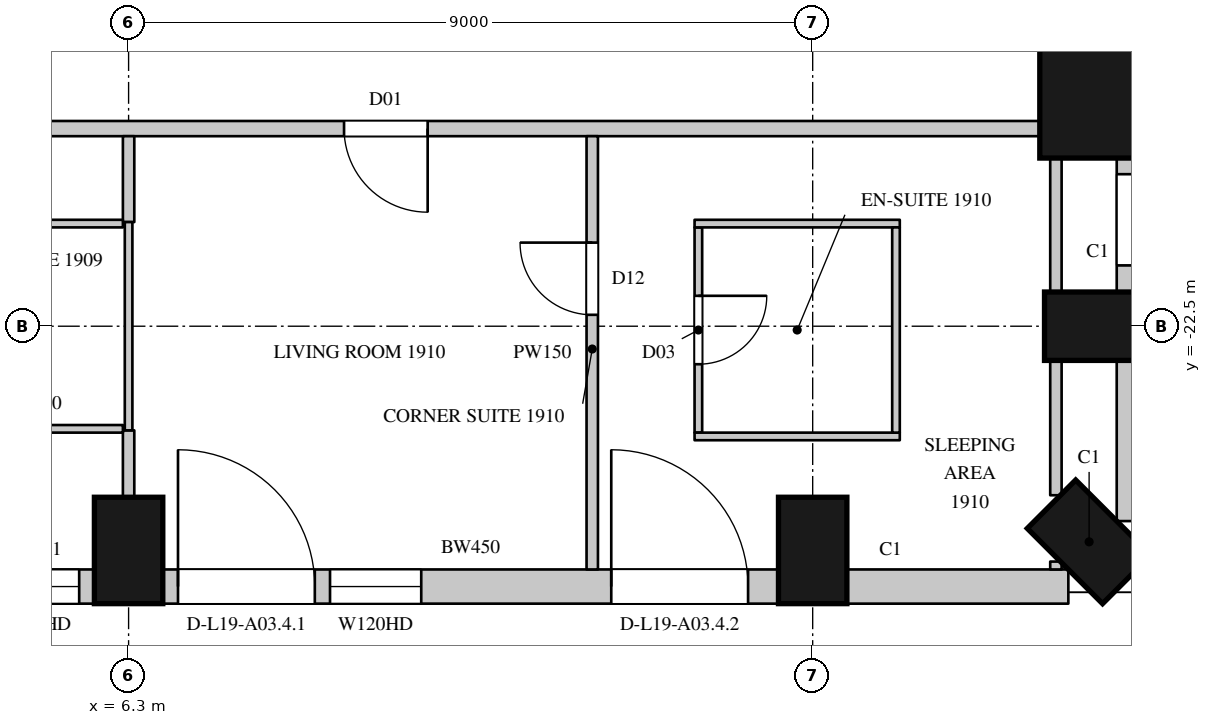
"""IFC4 building model, lengths in metres.
Left out: names, types, materials, properties, quantities, classifications, styles, units other than length and angle.
Written with IfcOpenShell. Run it as: python <this file> out.ifc"""

import sys

from ifc_helpers import new_model, si_unit, direction, frame, frame_2d, origin, origin_2d, place, context, subcontext, project, spatial, rectangle, circle, extrude, element, fill, save


model = new_model("IFC4")
c1 = context("Model", 3, precision=1e-05, world=origin(), true_north=direction((0.0, 1.0)))
c2 = subcontext(c1, "Body", "Model", "MODEL_VIEW")
j1 = project(units=[si_unit("LENGTHUNIT", "METRE"), si_unit("PLANEANGLEUNIT", "RADIAN")], contexts=[c1])
p1 = place(None, origin())
s1 = spatial("IfcSite", under=j1, at=p1, CompositionType="ELEMENT")
p2 = place(p1, origin())
s2 = spatial("IfcBuilding", under=s1, at=p2, CompositionType="ELEMENT")
p3 = place(p2, frame((0.0, 0.0, 98.7)))
s3 = spatial("IfcBuildingStorey", under=s2, at=p3, CompositionType="ELEMENT", Elevation=98.7)
for number, where, z_axis, x_axis in (
    (1, (6.3, -25.45, 0.0), (0.0, 0.0, 1.0), (1.0, 0.0, 0.0)),
    (2, (15.3, -25.45, 0.0), (0.0, 0.0, 1.0), (1.0, 0.0, 0.0)),
    (3, (18.937, -25.337, 0.0), (0.0, 0.0, 1.0), (0.707, 0.707, 0.0)),
    (4, (19.05, -22.5, 0.0), (0.0, 0.0, 1.0), (0.0, 1.0, 0.0)),
):
    element("IfcColumn", number, at=place(p3, frame(where, z_axis=z_axis, x_axis=x_axis)), inside=s3, PredefinedType="COLUMN", context=c2, shape_type="SweptSolid", body=[
        extrude(rectangle(XDim=0.9, YDim=1.4, at=origin_2d()), origin(), (0.0, 0.0, 1.0), 3.6),
    ])
p4 = place(p3, frame((19.088, -19.488, 0.0), z_axis=(0.0, 0.0, 1.0), x_axis=(1.0, 0.0, 0.0)))
e5 = element("IfcColumn", 5, at=p4, inside=s3, PredefinedType="COLUMN", context=c2, shape_type="SweptSolid", body=[
    extrude(circle(Radius=0.8, at=origin_2d()), origin(), (0.0, 0.0, 1.0), 3.6),
])
p5 = place(p3, frame((-2.25, -25.925, 0.0), z_axis=(0.0, 0.0, 1.0), x_axis=(1.0, 0.0, 0.0)))
e6 = element("IfcWall", 6, at=p5, inside=s3, PredefinedType="SOLIDWALL", context=c2, shape_type="SweptSolid", body=[
    extrude(rectangle(XDim=8.1, YDim=0.45, at=frame_2d((4.05, 0.0))), origin(), (0.0, 0.0, 1.0), 3.3),
])
p6 = place(p5, frame((0.2, 0.0, 0.0)))
e7 = element("IfcOpeningElement", 7, at=p6, cuts=e6, PredefinedType="OPENING", context=c2, shape_type="SweptSolid", body=[
    extrude(rectangle(XDim=1.8, YDim=2.4, at=frame_2d((0.9, 1.2))), frame((0.0, 0.235, 0.0), z_axis=(0.0, -1.0, 0.0), x_axis=(1.0, 0.0, 0.0)), (0.0, 0.0, 1.0), 0.47),
])
p7 = place(p5, frame((2.2, 0.0, 1.05)))
e8 = element("IfcOpeningElement", 8, at=p7, cuts=e6, PredefinedType="OPENING", context=c2, shape_type="SweptSolid", body=[
    extrude(rectangle(XDim=1.2, YDim=2.0, at=frame_2d((0.6, 1.0))), frame((0.0, 0.235, 0.0), z_axis=(0.0, -1.0, 0.0), x_axis=(1.0, 0.0, 0.0)), (0.0, 0.0, 1.0), 0.47),
])
p8 = place(p5, frame((4.7, 0.0, 0.0)))
e9 = element("IfcOpeningElement", 9, at=p8, cuts=e6, PredefinedType="OPENING", context=c2, shape_type="SweptSolid", body=[
    extrude(rectangle(XDim=1.8, YDim=2.4, at=frame_2d((0.9, 1.2))), frame((0.0, 0.235, 0.0), z_axis=(0.0, -1.0, 0.0), x_axis=(1.0, 0.0, 0.0)), (0.0, 0.0, 1.0), 0.47),
])
p9 = place(p5, frame((6.7, 0.0, 1.05)))
e10 = element("IfcOpeningElement", 10, at=p9, cuts=e6, PredefinedType="OPENING", context=c2, shape_type="SweptSolid", body=[
    extrude(rectangle(XDim=1.2, YDim=2.0, at=frame_2d((0.6, 1.0))), frame((0.0, 0.235, 0.0), z_axis=(0.0, -1.0, 0.0), x_axis=(1.0, 0.0, 0.0)), (0.0, 0.0, 1.0), 0.47),
])
p10 = place(p3, frame((6.75, -25.925, 0.0), z_axis=(0.0, 0.0, 1.0), x_axis=(1.0, 0.0, 0.0)))
e11 = element("IfcWall", 11, at=p10, inside=s3, PredefinedType="SOLIDWALL", context=c2, shape_type="SweptSolid", body=[
    extrude(rectangle(XDim=8.1, YDim=0.45, at=frame_2d((4.05, 0.0))), origin(), (0.0, 0.0, 1.0), 3.3),
])
p11 = place(p10, frame((0.2, 0.0, 0.0)))
e12 = element("IfcOpeningElement", 12, at=p11, cuts=e11, PredefinedType="OPENING", context=c2, shape_type="SweptSolid", body=[
    extrude(rectangle(XDim=1.8, YDim=2.4, at=frame_2d((0.9, 1.2))), frame((0.0, 0.235, 0.0), z_axis=(0.0, -1.0, 0.0), x_axis=(1.0, 0.0, 0.0)), (0.0, 0.0, 1.0), 0.47),
])
p12 = place(p10, frame((2.2, 0.0, 1.05)))
e13 = element("IfcOpeningElement", 13, at=p12, cuts=e11, PredefinedType="OPENING", context=c2, shape_type="SweptSolid", body=[
    extrude(rectangle(XDim=1.2, YDim=2.0, at=frame_2d((0.6, 1.0))), frame((0.0, 0.235, 0.0), z_axis=(0.0, -1.0, 0.0), x_axis=(1.0, 0.0, 0.0)), (0.0, 0.0, 1.0), 0.47),
])
p13 = place(p10, frame((5.9, 0.0, 0.0)))
e14 = element("IfcOpeningElement", 14, at=p13, cuts=e11, PredefinedType="OPENING", context=c2, shape_type="SweptSolid", body=[
    extrude(rectangle(XDim=1.8, YDim=2.4, at=frame_2d((0.9, 1.2))), frame((0.0, 0.235, 0.0), z_axis=(0.0, -1.0, 0.0), x_axis=(1.0, 0.0, 0.0)), (0.0, 0.0, 1.0), 0.47),
])
p14 = place(p3, frame((15.75, -25.925, 0.0), z_axis=(0.0, 0.0, 1.0), x_axis=(1.0, 0.0, 0.0)))
e15 = element("IfcWall", 15, at=p14, inside=s3, PredefinedType="SOLIDWALL", context=c2, shape_type="SweptSolid", body=[
    extrude(rectangle(XDim=2.914, YDim=0.45, at=frame_2d((1.457, 0.0))), origin(), (0.0, 0.0, 1.0), 3.3),
])
p15 = place(p3, frame((19.525, -25.064, 0.0), z_axis=(0.0, 0.0, 1.0), x_axis=(0.0, 1.0, 0.0)))
e16 = element("IfcWall", 16, at=p15, inside=s3, PredefinedType="SOLIDWALL", context=c2, shape_type="SweptSolid", body=[
    extrude(rectangle(XDim=2.114, YDim=0.45, at=frame_2d((1.057, 0.0))), origin(), (0.0, 0.0, 1.0), 3.3),
])
p16 = place(p3, frame((19.525, -22.05, 0.0), z_axis=(0.0, 0.0, 1.0), x_axis=(0.0, 1.0, 0.0)))
e17 = element("IfcWall", 17, at=p16, inside=s3, PredefinedType="SOLIDWALL", context=c2, shape_type="SweptSolid", body=[
    extrude(rectangle(XDim=1.792, YDim=0.45, at=frame_2d((0.896, 0.0))), origin(), (0.0, 0.0, 1.0), 3.3),
])
p17 = place(p16, frame((0.35, 0.0, 1.05)))
e18 = element("IfcOpeningElement", 18, at=p17, cuts=e17, PredefinedType="OPENING", context=c2, shape_type="SweptSolid", body=[
    extrude(rectangle(XDim=1.2, YDim=2.0, at=frame_2d((0.6, 1.0))), frame((0.0, 0.235, 0.0), z_axis=(0.0, -1.0, 0.0), x_axis=(1.0, 0.0, 0.0)), (0.0, 0.0, 1.0), 0.47),
])
p18 = place(p3, frame((-23.765, -19.9, 0.0), z_axis=(0.0, 0.0, 1.0), x_axis=(1.0, 0.0, 0.0)))
e19 = element("IfcWall", 19, at=p18, inside=s3, PredefinedType="PARTITIONING", context=c2, shape_type="SweptSolid", body=[
    extrude(rectangle(XDim=42.125, YDim=0.2, at=frame_2d((21.063, 0.0))), origin(), (0.0, 0.0, 1.0), 3.3),
])
p19 = place(p18, frame((6.2, 0.0, 0.0)))
e20 = element("IfcOpeningElement", 20, at=p19, cuts=e19, PredefinedType="OPENING", context=c2, shape_type="SweptSolid", body=[
    extrude(rectangle(XDim=0.95, YDim=2.2, at=frame_2d((0.475, 1.1))), frame((0.0, 0.11, 0.0), z_axis=(0.0, -1.0, 0.0), x_axis=(1.0, 0.0, 0.0)), (0.0, 0.0, 1.0), 0.22),
])
p20 = place(p18, frame((14.1, 0.0, 0.0)))
e21 = element("IfcOpeningElement", 21, at=p20, cuts=e19, PredefinedType="OPENING", context=c2, shape_type="SweptSolid", body=[
    extrude(rectangle(XDim=1.1, YDim=2.4, at=frame_2d((0.55, 1.2))), frame((0.0, 0.11, 0.0), z_axis=(0.0, -1.0, 0.0), x_axis=(1.0, 0.0, 0.0)), (0.0, 0.0, 1.0), 0.22),
])
p21 = place(p18, frame((24.2, 0.0, 0.0)))
e22 = element("IfcOpeningElement", 22, at=p21, cuts=e19, PredefinedType="OPENING", context=c2, shape_type="SweptSolid", body=[
    extrude(rectangle(XDim=0.95, YDim=2.2, at=frame_2d((0.475, 1.1))), frame((0.0, 0.11, 0.0), z_axis=(0.0, -1.0, 0.0), x_axis=(1.0, 0.0, 0.0)), (0.0, 0.0, 1.0), 0.22),
])
p22 = place(p18, frame((32.9, 0.0, 0.0)))
e23 = element("IfcOpeningElement", 23, at=p22, cuts=e19, PredefinedType="OPENING", context=c2, shape_type="SweptSolid", body=[
    extrude(rectangle(XDim=1.1, YDim=2.4, at=frame_2d((0.55, 1.2))), frame((0.0, 0.11, 0.0), z_axis=(0.0, -1.0, 0.0), x_axis=(1.0, 0.0, 0.0)), (0.0, 0.0, 1.0), 0.22),
])
p23 = place(p3, frame((6.3, -24.75, 0.0), z_axis=(0.0, 0.0, 1.0), x_axis=(0.0, 1.0, 0.0)))
e24 = element("IfcWall", 24, at=p23, inside=s3, PredefinedType="PARTITIONING", context=c2, shape_type="SweptSolid", body=[
    extrude(rectangle(XDim=0.88, YDim=0.15, at=frame_2d((0.44, 0.0))), origin(), (0.0, 0.0, 1.0), 2.75),
])
p24 = place(p3, frame((6.3, -21.13, 0.0), z_axis=(0.0, 0.0, 1.0), x_axis=(0.0, 1.0, 0.0)))
e25 = element("IfcWall", 25, at=p24, inside=s3, PredefinedType="PARTITIONING", context=c2, shape_type="SweptSolid", body=[
    extrude(rectangle(XDim=1.13, YDim=0.15, at=frame_2d((0.565, 0.0))), origin(), (0.0, 0.0, 1.0), 2.75),
])
p25 = place(p3, frame((12.4, -25.7, 0.0), z_axis=(0.0, 0.0, 1.0), x_axis=(0.0, 1.0, 0.0)))
e26 = element("IfcWall", 26, at=p25, inside=s3, PredefinedType="PARTITIONING", context=c2, shape_type="SweptSolid", body=[
    extrude(rectangle(XDim=5.7, YDim=0.15, at=frame_2d((2.85, 0.0))), origin(), (0.0, 0.0, 1.0), 3.3),
])
p26 = place(p25, frame((3.35, 0.0, 0.0)))
e27 = element("IfcOpeningElement", 27, at=p26, cuts=e26, PredefinedType="OPENING", context=c2, shape_type="SweptSolid", body=[
    extrude(rectangle(XDim=0.95, YDim=2.2, at=frame_2d((0.475, 1.1))), frame((0.0, 0.085, 0.0), z_axis=(0.0, -1.0, 0.0), x_axis=(1.0, 0.0, 0.0)), (0.0, 0.0, 1.0), 0.17),
])
p27 = place(p3, frame((18.5, -25.7, 0.0), z_axis=(0.0, 0.0, 1.0), x_axis=(0.0, 1.0, 0.0)))
e28 = element("IfcWall", 28, at=p27, inside=s3, PredefinedType="PARTITIONING", context=c2, shape_type="SweptSolid", body=[
    extrude(rectangle(XDim=0.104, YDim=0.15, at=frame_2d((0.052, 0.0))), origin(), (0.0, 0.0, 1.0), 3.3),
])
p28 = place(p3, frame((18.5, -24.724, 0.0), z_axis=(0.0, 0.0, 1.0), x_axis=(0.0, 1.0, 0.0)))
e29 = element("IfcWall", 29, at=p28, inside=s3, PredefinedType="PARTITIONING", context=c2, shape_type="SweptSolid", body=[
    extrude(rectangle(XDim=1.774, YDim=0.15, at=frame_2d((0.887, 0.0))), origin(), (0.0, 0.0, 1.0), 3.3),
])
p29 = place(p3, frame((18.5, -22.05, 0.0), z_axis=(0.0, 0.0, 1.0), x_axis=(0.0, 1.0, 0.0)))
e30 = element("IfcWall", 30, at=p29, inside=s3, PredefinedType="PARTITIONING", context=c2, shape_type="SweptSolid", body=[
    extrude(rectangle(XDim=1.964, YDim=0.15, at=frame_2d((0.982, 0.0))), origin(), (0.0, 0.0, 1.0), 3.3),
])
for number, where, z_axis, x_axis in (
    (31, (3.854, -23.85, 0.0), (0.0, 0.0, 1.0), (1.0, 0.0, 0.0)),
    (32, (3.854, -21.15, 0.0), (0.0, 0.0, 1.0), (1.0, 0.0, 0.0)),
):
    element("IfcWall", number, at=place(p3, frame(where, z_axis=z_axis, x_axis=x_axis)), inside=s3, PredefinedType="PARTITIONING", context=c2, shape_type="SweptSolid", body=[
        extrude(rectangle(XDim=2.371, YDim=0.1, at=frame_2d((1.186, 0.0))), origin(), (0.0, 0.0, 1.0), 3.3),
    ])
p30 = place(p3, frame((6.3, -23.87, 0.0), z_axis=(0.0, 0.0, 1.0), x_axis=(0.0, 1.0, 0.0)))
e33 = element("IfcWall", 33, at=p30, inside=s3, PredefinedType="PARTITIONING", context=c2, shape_type="SweptSolid", body=[
    extrude(rectangle(XDim=2.74, YDim=0.1, at=frame_2d((1.37, 0.0))), origin(), (0.0, 0.0, 1.0), 2.75),
])
p31 = place(p3, frame((13.796, -23.9, 0.0), z_axis=(0.0, 0.0, 1.0), x_axis=(0.0, 1.0, 0.0)))
e34 = element("IfcWall", 34, at=p31, inside=s3, PredefinedType="PARTITIONING", context=c2, shape_type="SweptSolid", body=[
    extrude(rectangle(XDim=2.7, YDim=0.1, at=frame_2d((1.35, 0.0))), origin(), (0.0, 0.0, 1.0), 3.3),
])
p32 = place(p31, frame((0.9, 0.0, 0.0)))
e35 = element("IfcOpeningElement", 35, at=p32, cuts=e34, PredefinedType="OPENING", context=c2, shape_type="SweptSolid", body=[
    extrude(rectangle(XDim=0.9, YDim=2.2, at=frame_2d((0.45, 1.1))), frame((0.0, 0.06, 0.0), z_axis=(0.0, -1.0, 0.0), x_axis=(1.0, 0.0, 0.0)), (0.0, 0.0, 1.0), 0.12),
])
for number, where, z_axis, x_axis in (
    (36, (13.746, -23.95, 0.0), (0.0, 0.0, 1.0), (1.0, 0.0, 0.0)),
    (37, (13.746, -21.15, 0.0), (0.0, 0.0, 1.0), (1.0, 0.0, 0.0)),
    (38, (16.396, -23.9, 0.0), (0.0, 0.0, 1.0), (0.0, 1.0, 0.0)),
):
    element("IfcWall", number, at=place(p3, frame(where, z_axis=z_axis, x_axis=x_axis)), inside=s3, PredefinedType="PARTITIONING", context=c2, shape_type="SweptSolid", body=[
        extrude(rectangle(XDim=2.7, YDim=0.1, at=frame_2d((1.35, 0.0))), origin(), (0.0, 0.0, 1.0), 3.3),
    ])
p33 = place(p9, origin())
e39 = element("IfcWindow", 39, at=p33, inside=s3, PartitioningType="SINGLE_PANEL", PredefinedType="WINDOW", context=c2, shape_type="SweptSolid", body=[
    extrude(rectangle(XDim=1.2, YDim=2.0, at=frame_2d((0.6, 1.0))), frame((0.0, 0.135, 0.0), z_axis=(0.0, -1.0, 0.0), x_axis=(1.0, 0.0, 0.0)), (0.0, 0.0, 1.0), 0.06),
])
fill(e10, e39)
p34 = place(p11, origin())
e40 = element("IfcDoor", 40, at=p34, inside=s3, OperationType="SLIDING_TO_LEFT", PredefinedType="DOOR", context=c2, shape_type="SweptSolid", body=[
    extrude(rectangle(XDim=1.8, YDim=2.4, at=frame_2d((0.9, 1.2))), frame((0.0, 0.13, 0.0), z_axis=(0.0, -1.0, 0.0), x_axis=(1.0, 0.0, 0.0)), (0.0, 0.0, 1.0), 0.05),
])
fill(e12, e40)
p35 = place(p12, origin())
e41 = element("IfcWindow", 41, at=p35, inside=s3, PartitioningType="SINGLE_PANEL", PredefinedType="WINDOW", context=c2, shape_type="SweptSolid", body=[
    extrude(rectangle(XDim=1.2, YDim=2.0, at=frame_2d((0.6, 1.0))), frame((0.0, 0.135, 0.0), z_axis=(0.0, -1.0, 0.0), x_axis=(1.0, 0.0, 0.0)), (0.0, 0.0, 1.0), 0.06),
])
fill(e13, e41)
p36 = place(p13, origin())
e42 = element("IfcDoor", 42, at=p36, inside=s3, OperationType="SLIDING_TO_LEFT", PredefinedType="DOOR", context=c2, shape_type="SweptSolid", body=[
    extrude(rectangle(XDim=1.8, YDim=2.4, at=frame_2d((0.9, 1.2))), frame((0.0, 0.13, 0.0), z_axis=(0.0, -1.0, 0.0), x_axis=(1.0, 0.0, 0.0)), (0.0, 0.0, 1.0), 0.05),
])
fill(e14, e42)
p37 = place(p17, origin())
e43 = element("IfcWindow", 43, at=p37, inside=s3, PartitioningType="SINGLE_PANEL", PredefinedType="WINDOW", context=c2, shape_type="SweptSolid", body=[
    extrude(rectangle(XDim=1.2, YDim=2.0, at=frame_2d((0.6, 1.0))), frame((0.0, 0.135, 0.0), z_axis=(0.0, -1.0, 0.0), x_axis=(1.0, 0.0, 0.0)), (0.0, 0.0, 1.0), 0.06),
])
fill(e18, e43)
p38 = place(p22, origin())
e44 = element("IfcDoor", 44, at=p38, inside=s3, OperationType="SINGLE_SWING_LEFT", PredefinedType="DOOR", context=c2, shape_type="SweptSolid", body=[
    extrude(rectangle(XDim=1.1, YDim=2.4, at=frame_2d((0.55, 1.2))), frame((0.0, 0.025, 0.0), z_axis=(0.0, -1.0, 0.0), x_axis=(1.0, 0.0, 0.0)), (0.0, 0.0, 1.0), 0.05),
])
fill(e23, e44)
p39 = place(p26, origin())
e45 = element("IfcDoor", 45, at=p39, inside=s3, OperationType="SINGLE_SWING_RIGHT", PredefinedType="DOOR", context=c2, shape_type="SweptSolid", body=[
    extrude(rectangle(XDim=0.95, YDim=2.2, at=frame_2d((0.475, 1.1))), frame((0.0, 0.025, 0.0), z_axis=(0.0, -1.0, 0.0), x_axis=(1.0, 0.0, 0.0)), (0.0, 0.0, 1.0), 0.05),
])
fill(e27, e45)
p40 = place(p32, origin())
e46 = element("IfcDoor", 46, at=p40, inside=s3, OperationType="SINGLE_SWING_LEFT", PredefinedType="DOOR", context=c2, shape_type="SweptSolid", body=[
    extrude(rectangle(XDim=0.9, YDim=2.2, at=frame_2d((0.45, 1.1))), frame((0.0, 0.025, 0.0), z_axis=(0.0, -1.0, 0.0), x_axis=(1.0, 0.0, 0.0)), (0.0, 0.0, 1.0), 0.05),
])
fill(e35, e46)
save(model, sys.argv[1])
